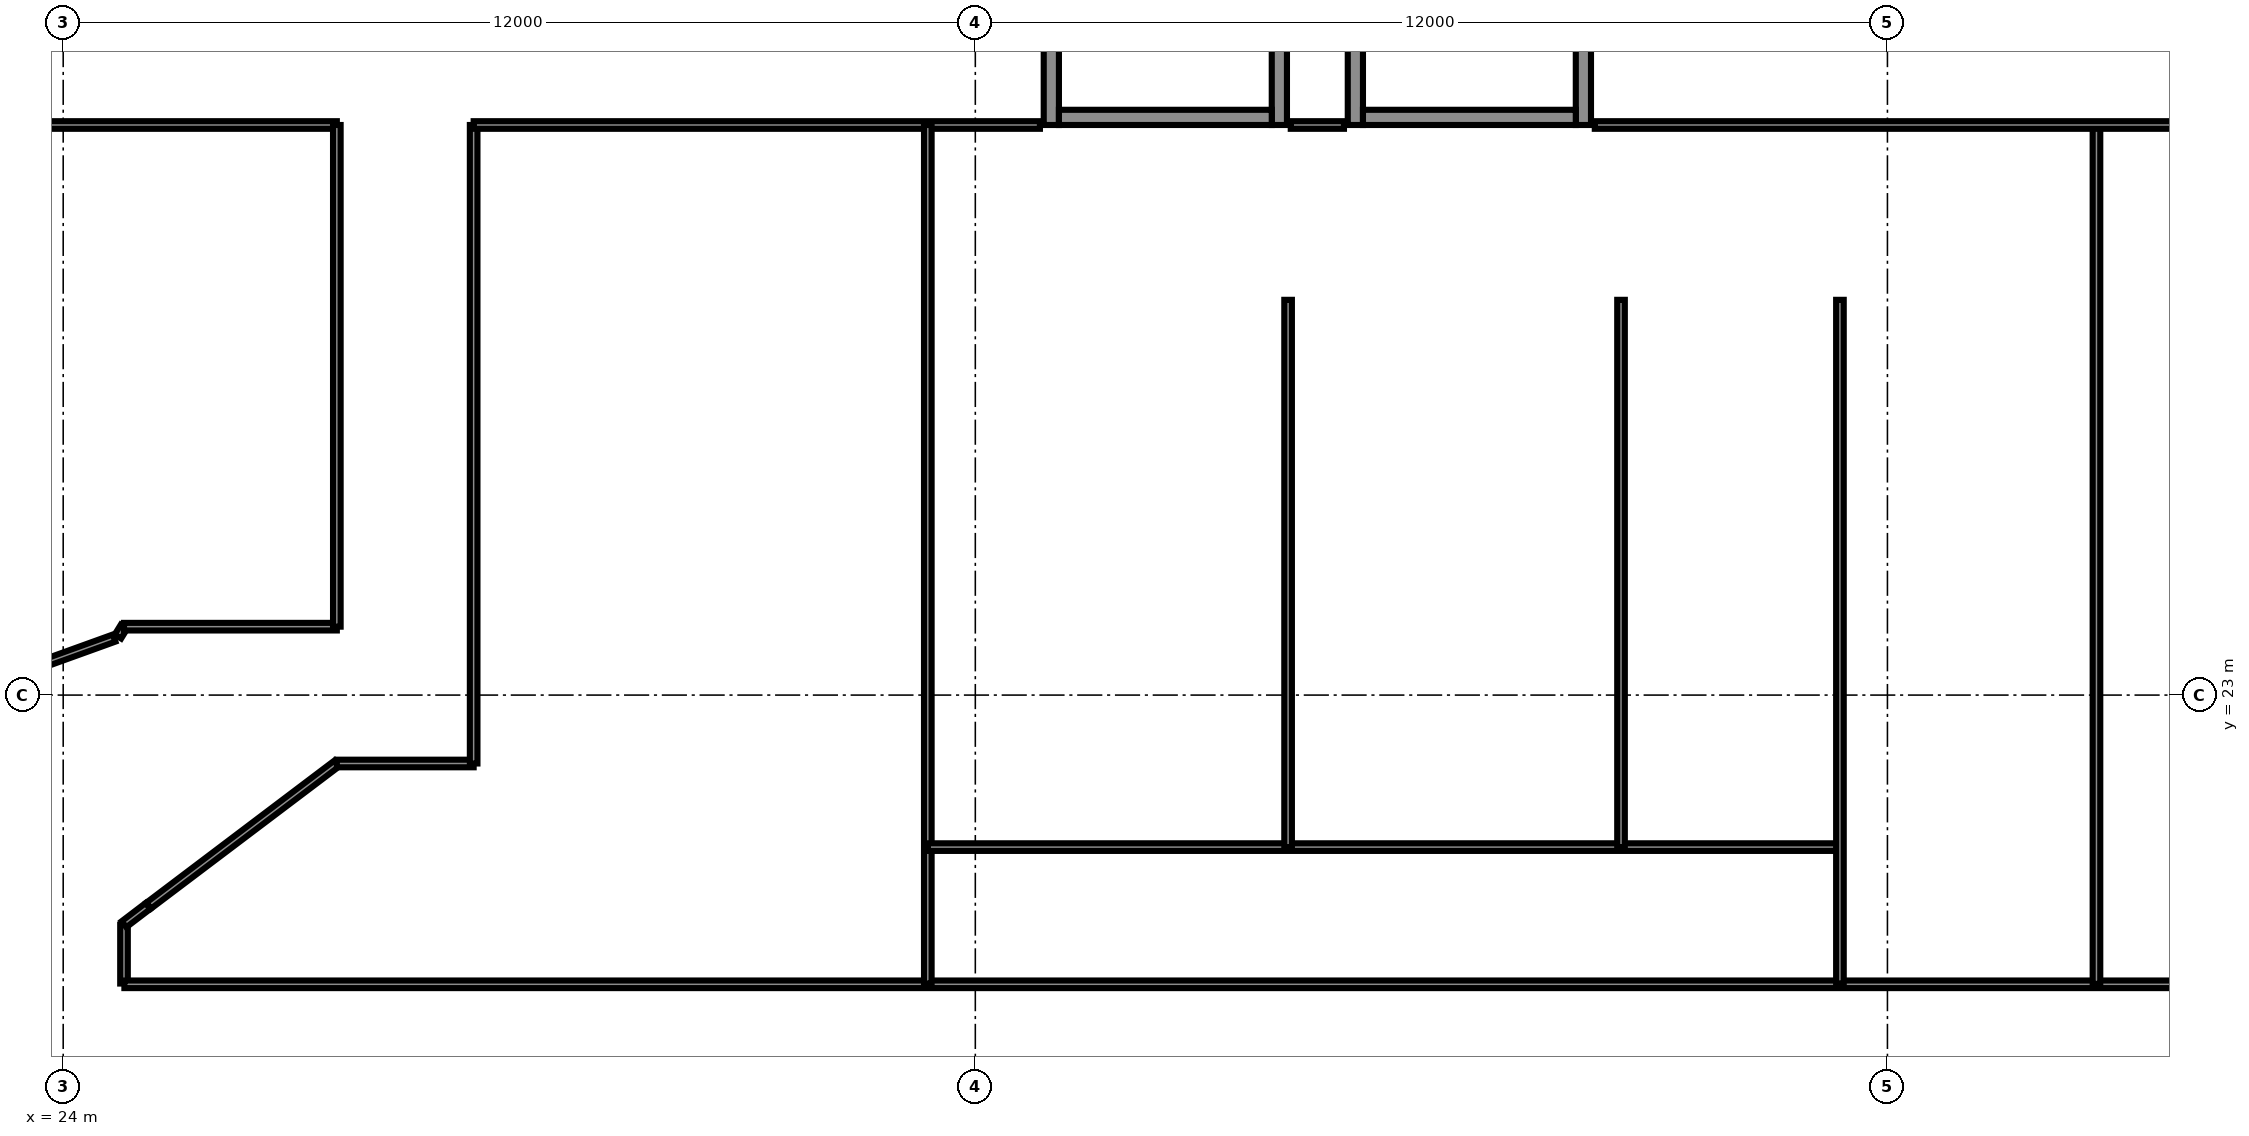
"""IFC4 building model, lengths in metres.
Left out: names, types, materials, properties, quantities, classifications, styles, units other than length and angle.
Written with IfcOpenShell. Run it as: python <this file> out.ifc"""

import sys

from ifc_helpers import new_model, si_unit, direction, frame, frame_2d, origin, origin_2d, place, context, subcontext, project, spatial, rectangle, i_section, extrude, element, fill, save


model = new_model("IFC4")
c1 = context("Model", 3, precision=1e-05, world=origin(), true_north=direction((0.0, 1.0)))
c2 = subcontext(c1, "Body", "Model", "MODEL_VIEW")
j1 = project(units=[si_unit("LENGTHUNIT", "METRE"), si_unit("PLANEANGLEUNIT", "RADIAN")], contexts=[c1])
p1 = place(None, origin())
s1 = spatial("IfcSite", under=j1, at=p1, CompositionType="ELEMENT")
p2 = place(p1, origin())
s2 = spatial("IfcBuilding", under=s1, at=p2, CompositionType="ELEMENT")
p3 = place(p2, frame((0.0, 0.0, 207.1)))
s3 = spatial("IfcBuildingStorey", under=s2, at=p3, CompositionType="ELEMENT", Elevation=207.1)
for number, where, z_axis, x_axis in (
    (1, (24.0, 23.0, 0.0), (0.0, 0.0, 1.0), (1.0, 0.0, 0.0)),
    (2, (36.0, 23.0, 0.0), (0.0, 0.0, 1.0), (1.0, 0.0, 0.0)),
    (3, (48.0, 23.0, 0.0), (0.0, 0.0, 1.0), (1.0, 0.0, 0.0)),
):
    element("IfcColumn", number, at=place(p3, frame(where, z_axis=z_axis, x_axis=x_axis)), inside=s3, PredefinedType="COLUMN", context=c2, shape_type="SweptSolid", body=[
        extrude(i_section(OverallWidth=0.3, OverallDepth=0.4, WebThickness=0.013, FlangeThickness=0.024, FilletRadius=0.027, at=origin_2d()), origin(), (0.0, 0.0, 1.0), 3.6),
    ])
p4 = place(p3, frame((37.0, 30.5, 0.0), z_axis=(0.0, 0.0, 1.0), x_axis=(0.0, 1.0, 0.0)))
e4 = element("IfcWall", 4, at=p4, inside=s3, PredefinedType="PARTITIONING", context=c2, shape_type="SweptSolid", body=[
    extrude(rectangle(XDim=3.5, YDim=0.2, at=frame_2d((1.75, 0.0))), origin(), (0.0, 0.0, 1.0), 3.2),
])
p5 = place(p4, frame((1.2, 0.0, 0.0)))
e5 = element("IfcOpeningElement", 5, at=p5, cuts=e4, PredefinedType="OPENING", context=c2, shape_type="SweptSolid", body=[
    extrude(rectangle(XDim=1.1, YDim=2.1, at=frame_2d((0.55, 1.05))), frame((0.0, 0.11, 0.0), z_axis=(0.0, -1.0, 0.0), x_axis=(1.0, 0.0, 0.0)), (0.0, 0.0, 1.0), 0.22),
])
p6 = place(p3, frame((40.0, 30.5, 0.0), z_axis=(0.0, 0.0, 1.0), x_axis=(0.0, 1.0, 0.0)))
e6 = element("IfcWall", 6, at=p6, inside=s3, PredefinedType="PARTITIONING", context=c2, shape_type="SweptSolid", body=[
    extrude(rectangle(XDim=3.5, YDim=0.2, at=frame_2d((1.75, 0.0))), origin(), (0.0, 0.0, 1.0), 3.2),
])
p7 = place(p3, frame((37.1, 30.6, 0.0), z_axis=(0.0, 0.0, 1.0), x_axis=(1.0, 0.0, 0.0)))
e7 = element("IfcWall", 7, at=p7, inside=s3, PredefinedType="PARTITIONING", context=c2, shape_type="SweptSolid", body=[
    extrude(rectangle(XDim=2.8, YDim=0.2, at=frame_2d((1.4, 0.0))), origin(), (0.0, 0.0, 1.0), 3.2),
])
p8 = place(p3, frame((41.0, 30.5, 0.0), z_axis=(0.0, 0.0, 1.0), x_axis=(0.0, 1.0, 0.0)))
e8 = element("IfcWall", 8, at=p8, inside=s3, PredefinedType="PARTITIONING", context=c2, shape_type="SweptSolid", body=[
    extrude(rectangle(XDim=3.5, YDim=0.2, at=frame_2d((1.75, 0.0))), origin(), (0.0, 0.0, 1.0), 3.2),
])
p9 = place(p3, frame((44.0, 30.5, 0.0), z_axis=(0.0, 0.0, 1.0), x_axis=(0.0, 1.0, 0.0)))
e9 = element("IfcWall", 9, at=p9, inside=s3, PredefinedType="PARTITIONING", context=c2, shape_type="SweptSolid", body=[
    extrude(rectangle(XDim=3.5, YDim=0.2, at=frame_2d((1.75, 0.0))), origin(), (0.0, 0.0, 1.0), 3.2),
])
p10 = place(p9, frame((1.2, 0.0, 0.0)))
e10 = element("IfcOpeningElement", 10, at=p10, cuts=e9, PredefinedType="OPENING", context=c2, shape_type="SweptSolid", body=[
    extrude(rectangle(XDim=1.1, YDim=2.1, at=frame_2d((0.55, 1.05))), frame((0.0, 0.11, 0.0), z_axis=(0.0, -1.0, 0.0), x_axis=(1.0, 0.0, 0.0)), (0.0, 0.0, 1.0), 0.22),
])
p11 = place(p3, frame((41.1, 30.6, 0.0), z_axis=(0.0, 0.0, 1.0), x_axis=(1.0, 0.0, 0.0)))
e11 = element("IfcWall", 11, at=p11, inside=s3, PredefinedType="PARTITIONING", context=c2, shape_type="SweptSolid", body=[
    extrude(rectangle(XDim=2.8, YDim=0.2, at=frame_2d((1.4, 0.0))), origin(), (0.0, 0.0, 1.0), 3.2),
])
p12 = place(p3, frame((23.0, 30.5, 0.0), z_axis=(0.0, 0.0, 1.0), x_axis=(1.0, 0.0, 0.0)))
e12 = element("IfcWall", 12, at=p12, inside=s3, PredefinedType="PARTITIONING", context=c2, shape_type="SweptSolid", body=[
    extrude(rectangle(XDim=4.6, YDim=0.1, at=frame_2d((2.3, 0.0))), origin(), (0.0, 0.0, 1.0), 3.2),
])
p13 = place(p3, frame((23.285, 23.25, 0.0), z_axis=(0.0, 0.0, 1.0), x_axis=(0.940585, 0.339559, 0.0)))
e13 = element("IfcWall", 13, at=p13, inside=s3, PredefinedType="PARTITIONING", context=c2, shape_type="SweptSolid", body=[
    extrude(rectangle(XDim=1.472, YDim=0.1, at=frame_2d((0.736, 0.0))), origin(), (0.0, 0.0, 1.0), 3.2),
])
p14 = place(p3, frame((24.72, 23.77, 0.0), z_axis=(0.0, 0.0, 1.0), x_axis=(0.524813, 0.851221, 0.0)))
e14 = element("IfcWall", 14, at=p14, inside=s3, PredefinedType="PARTITIONING", context=c2, shape_type="SweptSolid", body=[
    extrude(rectangle(XDim=0.153, YDim=0.1, at=frame_2d((0.076, 0.0))), origin(), (0.0, 0.0, 1.0), 3.2),
])
p15 = place(p3, frame((24.8, 19.205, 0.0), z_axis=(0.0, 0.0, 1.0), x_axis=(0.0, 1.0, 0.0)))
e15 = element("IfcWall", 15, at=p15, inside=s3, PredefinedType="PARTITIONING", context=c2, shape_type="SweptSolid", body=[
    extrude(rectangle(XDim=0.775, YDim=0.1, at=frame_2d((0.387, 0.0))), origin(), (0.0, 0.0, 1.0), 3.2),
])
p16 = place(p3, frame((24.8, 19.985, 0.0), z_axis=(0.0, 0.0, 1.0), x_axis=(0.795388, 0.606098, 0.0)))
e16 = element("IfcWall", 16, at=p16, inside=s3, PredefinedType="PARTITIONING", context=c2, shape_type="SweptSolid", body=[
    extrude(rectangle(XDim=0.396, YDim=0.1, at=frame_2d((0.198, 0.0))), origin(), (0.0, 0.0, 1.0), 3.2),
])
p17 = place(p3, frame((24.8, 23.9, 0.0), z_axis=(0.0, 0.0, 1.0), x_axis=(1.0, 0.0, 0.0)))
e17 = element("IfcWall", 17, at=p17, inside=s3, PredefinedType="PARTITIONING", context=c2, shape_type="SweptSolid", body=[
    extrude(rectangle(XDim=2.8, YDim=0.1, at=frame_2d((1.4, 0.0))), origin(), (0.0, 0.0, 1.0), 3.2),
])
p18 = place(p3, frame((24.805, 19.195, 0.0), z_axis=(0.0, 0.0, 1.0), x_axis=(1.0, 0.0, 0.0)))
e18 = element("IfcWall", 18, at=p18, inside=s3, PredefinedType="PARTITIONING", context=c2, shape_type="SweptSolid", body=[
    extrude(rectangle(XDim=40.265, YDim=0.1, at=frame_2d((20.133, 0.0))), origin(), (0.0, 0.0, 1.0), 3.2),
])
p19 = place(p18, frame((4.945, 0.0, 0.0)))
e19 = element("IfcOpeningElement", 19, at=p19, cuts=e18, PredefinedType="OPENING", context=c2, shape_type="SweptSolid", body=[
    extrude(rectangle(XDim=1.0, YDim=2.1, at=frame_2d((0.5, 1.05))), frame((0.0, 0.06, 0.0), z_axis=(0.0, -1.0, 0.0), x_axis=(1.0, 0.0, 0.0)), (0.0, 0.0, 1.0), 0.12),
])
p20 = place(p18, frame((30.57, 0.0, 0.0)))
e20 = element("IfcOpeningElement", 20, at=p20, cuts=e18, PredefinedType="OPENING", context=c2, shape_type="SweptSolid", body=[
    extrude(rectangle(XDim=1.0, YDim=2.1, at=frame_2d((0.5, 1.05))), frame((0.0, 0.06, 0.0), z_axis=(0.0, -1.0, 0.0), x_axis=(1.0, 0.0, 0.0)), (0.0, 0.0, 1.0), 0.12),
])
p21 = place(p18, frame((16.02, 0.0, 0.0)))
e21 = element("IfcOpeningElement", 21, at=p21, cuts=e18, PredefinedType="OPENING", context=c2, shape_type="SweptSolid", body=[
    extrude(rectangle(XDim=1.1, YDim=2.1, at=frame_2d((0.55, 1.05))), frame((0.0, 0.06, 0.0), z_axis=(0.0, -1.0, 0.0), x_axis=(1.0, 0.0, 0.0)), (0.0, 0.0, 1.0), 0.12),
])
p22 = place(p3, frame((25.125, 20.23, 0.0), z_axis=(0.0, 0.0, 1.0), x_axis=(0.797858, 0.60284, 0.0)))
e22 = element("IfcWall", 22, at=p22, inside=s3, PredefinedType="PARTITIONING", context=c2, shape_type="SweptSolid", body=[
    extrude(rectangle(XDim=3.102, YDim=0.1, at=frame_2d((1.551, 0.0))), origin(), (0.0, 0.0, 1.0), 3.2),
])
p23 = place(p3, frame((27.6, 23.9, 0.0), z_axis=(0.0, 0.0, 1.0), x_axis=(0.0, 1.0, 0.0)))
e23 = element("IfcWall", 23, at=p23, inside=s3, PredefinedType="PARTITIONING", context=c2, shape_type="SweptSolid", body=[
    extrude(rectangle(XDim=6.6, YDim=0.1, at=frame_2d((3.3, 0.0))), origin(), (0.0, 0.0, 1.0), 3.2),
])
p24 = place(p3, frame((27.6, 22.1, 0.0), z_axis=(0.0, 0.0, 1.0), x_axis=(1.0, 0.0, 0.0)))
e24 = element("IfcWall", 24, at=p24, inside=s3, PredefinedType="PARTITIONING", context=c2, shape_type="SweptSolid", body=[
    extrude(rectangle(XDim=1.8, YDim=0.1, at=frame_2d((0.9, 0.0))), origin(), (0.0, 0.0, 1.0), 3.2),
])
p25 = place(p3, frame((29.4, 22.1, 0.0), z_axis=(0.0, 0.0, 1.0), x_axis=(0.0, 1.0, 0.0)))
e25 = element("IfcWall", 25, at=p25, inside=s3, PredefinedType="PARTITIONING", context=c2, shape_type="SweptSolid", body=[
    extrude(rectangle(XDim=8.4, YDim=0.1, at=frame_2d((4.2, 0.0))), origin(), (0.0, 0.0, 1.0), 3.2),
])
p26 = place(p3, frame((29.4, 30.5, 0.0), z_axis=(0.0, 0.0, 1.0), x_axis=(1.0, 0.0, 0.0)))
e26 = element("IfcWall", 26, at=p26, inside=s3, PredefinedType="PARTITIONING", context=c2, shape_type="SweptSolid", body=[
    extrude(rectangle(XDim=7.45, YDim=0.1, at=frame_2d((3.725, 0.0))), origin(), (0.0, 0.0, 1.0), 3.2),
])
p27 = place(p3, frame((35.375, 19.205, 0.0), z_axis=(0.0, 0.0, 1.0), x_axis=(0.0, 1.0, 0.0)))
e27 = element("IfcWall", 27, at=p27, inside=s3, PredefinedType="PARTITIONING", context=c2, shape_type="SweptSolid", body=[
    extrude(rectangle(XDim=11.295, YDim=0.1, at=frame_2d((5.647, 0.0))), origin(), (0.0, 0.0, 1.0), 3.2),
])
p28 = place(p3, frame((35.375, 21.0, 0.0), z_axis=(0.0, 0.0, 1.0), x_axis=(1.0, 0.0, 0.0)))
e28 = element("IfcWall", 28, at=p28, inside=s3, PredefinedType="PARTITIONING", context=c2, shape_type="SweptSolid", body=[
    extrude(rectangle(XDim=12.0, YDim=0.1, at=frame_2d((6.0, 0.0))), origin(), (0.0, 0.0, 1.0), 3.2),
])
p29 = place(p28, frame((1.968, 0.0, 0.0)))
e29 = element("IfcOpeningElement", 29, at=p29, cuts=e28, PredefinedType="OPENING", context=c2, shape_type="SweptSolid", body=[
    extrude(rectangle(XDim=0.9, YDim=2.1, at=frame_2d((0.45, 1.05))), frame((0.0, 0.06, 0.0), z_axis=(0.0, -1.0, 0.0), x_axis=(1.0, 0.0, 0.0)), (0.0, 0.0, 1.0), 0.12),
])
p30 = place(p28, frame((6.47, 0.0, 0.0)))
e30 = element("IfcOpeningElement", 30, at=p30, cuts=e28, PredefinedType="OPENING", context=c2, shape_type="SweptSolid", body=[
    extrude(rectangle(XDim=0.9, YDim=2.1, at=frame_2d((0.45, 1.05))), frame((0.0, 0.06, 0.0), z_axis=(0.0, -1.0, 0.0), x_axis=(1.0, 0.0, 0.0)), (0.0, 0.0, 1.0), 0.12),
])
p31 = place(p28, frame((10.1, 0.0, 0.0)))
e31 = element("IfcOpeningElement", 31, at=p31, cuts=e28, PredefinedType="OPENING", context=c2, shape_type="SweptSolid", body=[
    extrude(rectangle(XDim=1.0, YDim=2.1, at=frame_2d((0.5, 1.05))), frame((0.0, 0.06, 0.0), z_axis=(0.0, -1.0, 0.0), x_axis=(1.0, 0.0, 0.0)), (0.0, 0.0, 1.0), 0.12),
])
p32 = place(p3, frame((35.375, 28.2, 0.0), z_axis=(0.0, 0.0, 1.0), x_axis=(1.0, 0.0, 0.0)))
e32 = element("IfcWall", 32, at=p32, inside=s3, PredefinedType="PARTITIONING", context=c2, shape_type="SweptSolid", body=[
    extrude(rectangle(XDim=12.0, YDim=0.1, at=frame_2d((6.0, 0.0))), origin(), (0.0, 0.0, 1.0), 3.2),
])
for number, where, z_axis, x_axis in (
    (33, (40.115, 21.0, 0.0), (0.0, 0.0, 1.0), (0.0, 1.0, 0.0)),
    (34, (44.495, 21.0, 0.0), (0.0, 0.0, 1.0), (0.0, 1.0, 0.0)),
):
    element("IfcWall", number, at=place(p3, frame(where, z_axis=z_axis, x_axis=x_axis)), inside=s3, PredefinedType="PARTITIONING", context=c2, shape_type="SweptSolid", body=[
        extrude(rectangle(XDim=7.2, YDim=0.1, at=frame_2d((3.6, 0.0))), origin(), (0.0, 0.0, 1.0), 3.2),
    ])
p33 = place(p3, frame((47.375, 19.205, 0.0), z_axis=(0.0, 0.0, 1.0), x_axis=(0.0, 1.0, 0.0)))
e35 = element("IfcWall", 35, at=p33, inside=s3, PredefinedType="PARTITIONING", context=c2, shape_type="SweptSolid", body=[
    extrude(rectangle(XDim=8.995, YDim=0.1, at=frame_2d((4.498, 0.0))), origin(), (0.0, 0.0, 1.0), 3.2),
])
p34 = place(p3, frame((50.75, 19.2, 0.0), z_axis=(0.0, 0.0, 1.0), x_axis=(0.0, 1.0, 0.0)))
e36 = element("IfcWall", 36, at=p34, inside=s3, PredefinedType="PARTITIONING", context=c2, shape_type="SweptSolid", body=[
    extrude(rectangle(XDim=11.3, YDim=0.1, at=frame_2d((5.65, 0.0))), origin(), (0.0, 0.0, 1.0), 3.2),
])
p35 = place(p3, frame((40.15, 30.5, 0.0), z_axis=(0.0, 0.0, 1.0), x_axis=(1.0, 0.0, 0.0)))
e37 = element("IfcWall", 37, at=p35, inside=s3, PredefinedType="PARTITIONING", context=c2, shape_type="SweptSolid", body=[
    extrude(rectangle(XDim=0.7, YDim=0.1, at=frame_2d((0.35, 0.0))), origin(), (0.0, 0.0, 1.0), 3.2),
])
p36 = place(p3, frame((44.15, 30.5, 0.0), z_axis=(0.0, 0.0, 1.0), x_axis=(1.0, 0.0, 0.0)))
e38 = element("IfcWall", 38, at=p36, inside=s3, PredefinedType="PARTITIONING", context=c2, shape_type="SweptSolid", body=[
    extrude(rectangle(XDim=13.85, YDim=0.1, at=frame_2d((6.925, 0.0))), origin(), (0.0, 0.0, 1.0), 3.2),
])
p37 = place(p36, frame((2.77, 0.0, 0.0)))
e39 = element("IfcOpeningElement", 39, at=p37, cuts=e38, PredefinedType="OPENING", context=c2, shape_type="SweptSolid", body=[
    extrude(rectangle(XDim=1.0, YDim=2.1, at=frame_2d((0.5, 1.05))), frame((0.0, 0.06, 0.0), z_axis=(0.0, -1.0, 0.0), x_axis=(1.0, 0.0, 0.0)), (0.0, 0.0, 1.0), 0.12),
])
p38 = place(p19, origin())
e40 = element("IfcDoor", 40, at=p38, inside=s3, OperationType="SINGLE_SWING_LEFT", PredefinedType="DOOR", context=c2, shape_type="SweptSolid", body=[
    extrude(rectangle(XDim=1.0, YDim=2.1, at=frame_2d((0.5, 1.05))), frame((0.0, 0.025, 0.0), z_axis=(0.0, -1.0, 0.0), x_axis=(1.0, 0.0, 0.0)), (0.0, 0.0, 1.0), 0.05),
])
fill(e19, e40)
p39 = place(p21, origin())
e41 = element("IfcDoor", 41, at=p39, inside=s3, OperationType="SINGLE_SWING_LEFT", PredefinedType="DOOR", context=c2, shape_type="SweptSolid", body=[
    extrude(rectangle(XDim=1.1, YDim=2.1, at=frame_2d((0.55, 1.05))), frame((0.0, 0.025, 0.0), z_axis=(0.0, -1.0, 0.0), x_axis=(1.0, 0.0, 0.0)), (0.0, 0.0, 1.0), 0.05),
])
fill(e21, e41)
p40 = place(p29, origin())
e42 = element("IfcDoor", 42, at=p40, inside=s3, OperationType="SINGLE_SWING_LEFT", PredefinedType="DOOR", context=c2, shape_type="SweptSolid", body=[
    extrude(rectangle(XDim=0.9, YDim=2.1, at=frame_2d((0.45, 1.05))), frame((0.0, 0.025, 0.0), z_axis=(0.0, -1.0, 0.0), x_axis=(1.0, 0.0, 0.0)), (0.0, 0.0, 1.0), 0.05),
])
fill(e29, e42)
p41 = place(p30, origin())
e43 = element("IfcDoor", 43, at=p41, inside=s3, OperationType="SINGLE_SWING_RIGHT", PredefinedType="DOOR", context=c2, shape_type="SweptSolid", body=[
    extrude(rectangle(XDim=0.9, YDim=2.1, at=frame_2d((0.45, 1.05))), frame((0.0, 0.025, 0.0), z_axis=(0.0, -1.0, 0.0), x_axis=(1.0, 0.0, 0.0)), (0.0, 0.0, 1.0), 0.05),
])
fill(e30, e43)
p42 = place(p31, origin())
e44 = element("IfcDoor", 44, at=p42, inside=s3, OperationType="SINGLE_SWING_RIGHT", PredefinedType="DOOR", context=c2, shape_type="SweptSolid", body=[
    extrude(rectangle(XDim=1.0, YDim=2.1, at=frame_2d((0.5, 1.05))), frame((0.0, 0.025, 0.0), z_axis=(0.0, -1.0, 0.0), x_axis=(1.0, 0.0, 0.0)), (0.0, 0.0, 1.0), 0.05),
])
fill(e31, e44)
p43 = place(p37, origin())
e45 = element("IfcDoor", 45, at=p43, inside=s3, OperationType="SINGLE_SWING_RIGHT", PredefinedType="DOOR", context=c2, shape_type="SweptSolid", body=[
    extrude(rectangle(XDim=1.0, YDim=2.1, at=frame_2d((0.5, 1.05))), frame((0.0, 0.025, 0.0), z_axis=(0.0, -1.0, 0.0), x_axis=(1.0, 0.0, 0.0)), (0.0, 0.0, 1.0), 0.05),
])
fill(e39, e45)
save(model, sys.argv[1])
